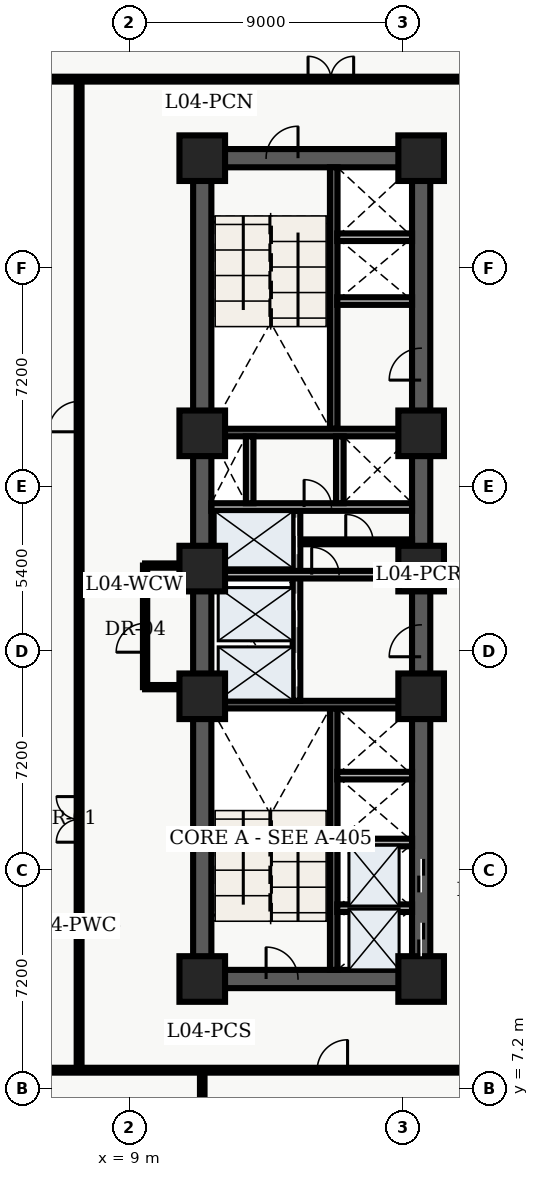
"""IFC4 building model, lengths in metres.
Left out: names, types, materials, properties, quantities, classifications, styles, units other than length and angle.
Written with IfcOpenShell. Run it as: python <this file> out.ifc"""

import sys

from ifc_helpers import new_model, entity, si_unit, converted_unit, direction, frame, origin_with_axes, origin_2d_with_axis, place, context, subcontext, project, spatial, polyline, rectangle, outline, extrude, element, fill, save


model = new_model("IFC4")
c1 = context("Model", 3, precision=1e-05, world=origin_with_axes(), true_north=direction((0.0, 1.0)))
c2 = subcontext(c1, "Body", "Model", "MODEL_VIEW")
j1 = project(units=[si_unit("LENGTHUNIT", "METRE"), converted_unit("PLANEANGLEUNIT", "DEGREE", entity("IfcPlaneAngleMeasure", 0.017), si_unit("PLANEANGLEUNIT", "RADIAN"), dimensions=[0, 0, 0, 0, 0, 0, 0])], contexts=[c1])
p1 = place(None, origin_with_axes())
s1 = spatial("IfcSite", under=j1, at=p1, CompositionType="ELEMENT")
p2 = place(p1, origin_with_axes())
s2 = spatial("IfcBuilding", under=s1, at=p2, CompositionType="ELEMENT")
p3 = place(p2, frame((0.0, 0.0, 19.8), z_axis=(0.0, 0.0, 1.0), x_axis=(1.0, 0.0, 0.0)))
s3 = spatial("IfcBuildingStorey", under=s2, at=p3, CompositionType="ELEMENT", Elevation=19.8)
p4 = place(p3, frame((11.4, 10.8, 0.0), z_axis=(0.0, 0.0, 1.0), x_axis=(0.0, 1.0, 0.0)))
e1 = element("IfcWall", 1, at=p4, inside=s3, PredefinedType="SHEAR", context=c2, shape_type="SweptSolid", body=[
    extrude(outline(polyline([(0.0, -0.3), (27.0, -0.3), (27.0, 0.3), (0.0, 0.3), (0.0, -0.3)])), origin_with_axes(), (0.0, 0.0, 1.0), 4.26),
])
p5 = place(p3, frame((11.4, 10.8, 0.0), z_axis=(0.0, 0.0, 1.0), x_axis=(1.0, 0.0, 0.0)))
e2 = element("IfcWall", 2, at=p5, inside=s3, PredefinedType="SHEAR", context=c2, shape_type="SweptSolid", body=[
    extrude(outline(polyline([(0.0, -0.3), (7.2, -0.3), (7.2, 0.3), (0.0, 0.3), (0.0, -0.3)])), origin_with_axes(), (0.0, 0.0, 1.0), 4.26),
])
p6 = place(p5, frame((2.625, 0.0, 0.0), z_axis=(0.0, 0.0, 1.0), x_axis=(1.0, 0.0, 0.0)))
e3 = element("IfcOpeningElement", 3, at=p6, cuts=e2, PredefinedType="OPENING", context=c2, shape_type="SweptSolid", body=[
    extrude(rectangle(XDim=1.05, YDim=0.62, at=origin_2d_with_axis()), origin_with_axes(), (0.0, 0.0, 1.0), 2.15),
])
p7 = place(p3, frame((11.4, 37.8, 0.0), z_axis=(0.0, 0.0, 1.0), x_axis=(1.0, 0.0, 0.0)))
e4 = element("IfcWall", 4, at=p7, inside=s3, PredefinedType="SHEAR", context=c2, shape_type="SweptSolid", body=[
    extrude(outline(polyline([(0.0, -0.3), (7.2, -0.3), (7.2, 0.3), (0.0, 0.3), (0.0, -0.3)])), origin_with_axes(), (0.0, 0.0, 1.0), 4.26),
])
p8 = place(p7, frame((2.625, 0.0, 0.0), z_axis=(0.0, 0.0, 1.0), x_axis=(1.0, 0.0, 0.0)))
e5 = element("IfcOpeningElement", 5, at=p8, cuts=e4, PredefinedType="OPENING", context=c2, shape_type="SweptSolid", body=[
    extrude(rectangle(XDim=1.05, YDim=0.62, at=origin_2d_with_axis()), origin_with_axes(), (0.0, 0.0, 1.0), 2.15),
])
p9 = place(p3, frame((18.6, 10.8, 0.0), z_axis=(0.0, 0.0, 1.0), x_axis=(0.0, 1.0, 0.0)))
e6 = element("IfcWall", 6, at=p9, inside=s3, PredefinedType="SHEAR", context=c2, shape_type="SweptSolid", body=[
    extrude(outline(polyline([(0.0, -0.3), (13.5, -0.3), (13.5, 0.3), (0.0, 0.3), (0.0, -0.3)])), origin_with_axes(), (0.0, 0.0, 1.0), 4.26),
])
p10 = place(p9, frame((1.3, 0.0, 0.0), z_axis=(0.0, 0.0, 1.0), x_axis=(1.0, 0.0, 0.0)))
e7 = element("IfcOpeningElement", 7, at=p10, cuts=e6, PredefinedType="OPENING", context=c2, shape_type="SweptSolid", body=[
    extrude(rectangle(XDim=1.1, YDim=0.62, at=origin_2d_with_axis()), origin_with_axes(), (0.0, 0.0, 1.0), 2.15),
])
p11 = place(p9, frame((3.4, 0.0, 0.0), z_axis=(0.0, 0.0, 1.0), x_axis=(1.0, 0.0, 0.0)))
e8 = element("IfcOpeningElement", 8, at=p11, cuts=e6, PredefinedType="OPENING", context=c2, shape_type="SweptSolid", body=[
    extrude(rectangle(XDim=1.1, YDim=0.62, at=origin_2d_with_axis()), origin_with_axes(), (0.0, 0.0, 1.0), 2.15),
])
p12 = place(p9, frame((11.125, 0.0, 0.0), z_axis=(0.0, 0.0, 1.0), x_axis=(1.0, 0.0, 0.0)))
e9 = element("IfcOpeningElement", 9, at=p12, cuts=e6, PredefinedType="OPENING", context=c2, shape_type="SweptSolid", body=[
    extrude(rectangle(XDim=1.05, YDim=0.62, at=origin_2d_with_axis()), origin_with_axes(), (0.0, 0.0, 1.0), 2.15),
])
p13 = place(p3, frame((18.6, 24.3, 0.0), z_axis=(0.0, 0.0, 1.0), x_axis=(0.0, 1.0, 0.0)))
e10 = element("IfcWall", 10, at=p13, inside=s3, PredefinedType="SHEAR", context=c2, shape_type="SweptSolid", body=[
    extrude(outline(polyline([(0.0, -0.3), (13.5, -0.3), (13.5, 0.3), (0.0, 0.3), (0.0, -0.3)])), origin_with_axes(), (0.0, 0.0, 1.0), 4.26),
])
p14 = place(p13, frame((6.725, 0.0, 0.0), z_axis=(0.0, 0.0, 1.0), x_axis=(1.0, 0.0, 0.0)))
e11 = element("IfcOpeningElement", 11, at=p14, cuts=e10, PredefinedType="OPENING", context=c2, shape_type="SweptSolid", body=[
    extrude(rectangle(XDim=1.05, YDim=0.62, at=origin_2d_with_axis()), origin_with_axes(), (0.0, 0.0, 1.0), 2.15),
])
p15 = place(p3, frame((15.725, 11.1, 0.0), z_axis=(0.0, 0.0, 1.0), x_axis=(0.0, 1.0, 0.0)))
e12 = element("IfcWall", 12, at=p15, inside=s3, PredefinedType="SHEAR", context=c2, shape_type="SweptSolid", body=[
    extrude(outline(polyline([(0.0, -0.125), (8.6, -0.125), (8.6, 0.125), (0.0, 0.125), (0.0, -0.125)])), origin_with_axes(), (0.0, 0.0, 1.0), 4.26),
])
p16 = place(p3, frame((11.7, 19.825, 0.0), z_axis=(0.0, 0.0, 1.0), x_axis=(1.0, 0.0, 0.0)))
e13 = element("IfcWall", 13, at=p16, inside=s3, PredefinedType="SHEAR", context=c2, shape_type="SweptSolid", body=[
    extrude(outline(polyline([(0.0, -0.125), (6.6, -0.125), (6.6, 0.125), (0.0, 0.125), (0.0, -0.125)])), origin_with_axes(), (0.0, 0.0, 1.0), 4.26),
])
p17 = place(p3, frame((15.725, 28.9, 0.0), z_axis=(0.0, 0.0, 1.0), x_axis=(0.0, 1.0, 0.0)))
e14 = element("IfcWall", 14, at=p17, inside=s3, PredefinedType="SHEAR", context=c2, shape_type="SweptSolid", body=[
    extrude(outline(polyline([(0.0, -0.125), (8.6, -0.125), (8.6, 0.125), (0.0, 0.125), (0.0, -0.125)])), origin_with_axes(), (0.0, 0.0, 1.0), 4.26),
])
p18 = place(p3, frame((11.7, 28.775, 0.0), z_axis=(0.0, 0.0, 1.0), x_axis=(1.0, 0.0, 0.0)))
e15 = element("IfcWall", 15, at=p18, inside=s3, PredefinedType="SHEAR", context=c2, shape_type="SweptSolid", body=[
    extrude(outline(polyline([(0.0, -0.125), (6.6, -0.125), (6.6, 0.125), (0.0, 0.125), (0.0, -0.125)])), origin_with_axes(), (0.0, 0.0, 1.0), 4.26),
])
p19 = place(p3, frame((14.5, 19.95, 0.0), z_axis=(0.0, 0.0, 1.0), x_axis=(0.0, 1.0, 0.0)))
e16 = element("IfcWall", 16, at=p19, inside=s3, PredefinedType="SOLIDWALL", context=c2, shape_type="SweptSolid", body=[
    extrude(outline(polyline([(0.0, -0.125), (6.25, -0.125), (6.25, 0.125), (0.0, 0.125), (0.0, -0.125)])), origin_with_axes(), (0.0, 0.0, 1.0), 3.3),
])
p20 = place(p19, frame((1.025, 0.0, 0.0), z_axis=(0.0, 0.0, 1.0), x_axis=(1.0, 0.0, 0.0)))
e17 = element("IfcOpeningElement", 17, at=p20, cuts=e16, PredefinedType="OPENING", context=c2, shape_type="SweptSolid", body=[
    extrude(rectangle(XDim=1.1, YDim=0.27, at=origin_2d_with_axis()), origin_with_axes(), (0.0, 0.0, 1.0), 2.15),
])
p21 = place(p19, frame((2.975, 0.0, 0.0), z_axis=(0.0, 0.0, 1.0), x_axis=(1.0, 0.0, 0.0)))
e18 = element("IfcOpeningElement", 18, at=p21, cuts=e16, PredefinedType="OPENING", context=c2, shape_type="SweptSolid", body=[
    extrude(rectangle(XDim=1.1, YDim=0.27, at=origin_2d_with_axis()), origin_with_axes(), (0.0, 0.0, 1.0), 2.15),
])
p22 = place(p19, frame((5.425, 0.0, 0.0), z_axis=(0.0, 0.0, 1.0), x_axis=(1.0, 0.0, 0.0)))
e19 = element("IfcOpeningElement", 19, at=p22, cuts=e16, PredefinedType="OPENING", context=c2, shape_type="SweptSolid", body=[
    extrude(rectangle(XDim=1.2, YDim=0.27, at=origin_2d_with_axis()), origin_with_axes(), (0.0, 0.0, 1.0), 2.15),
])
p23 = place(p3, frame((11.7, 24.1, 0.0), z_axis=(0.0, 0.0, 1.0), x_axis=(1.0, 0.0, 0.0)))
e20 = element("IfcWall", 20, at=p23, inside=s3, PredefinedType="SOLIDWALL", context=c2, shape_type="SweptSolid", body=[
    extrude(outline(polyline([(0.0, -0.125), (6.6, -0.125), (6.6, 0.125), (0.0, 0.125), (0.0, -0.125)])), origin_with_axes(), (0.0, 0.0, 1.0), 3.3),
])
p24 = place(p23, frame((3.75, 0.0, 0.0), z_axis=(0.0, 0.0, 1.0), x_axis=(1.0, 0.0, 0.0)))
e21 = element("IfcOpeningElement", 21, at=p24, cuts=e20, PredefinedType="OPENING", context=c2, shape_type="SweptSolid", body=[
    extrude(rectangle(XDim=0.9, YDim=0.27, at=origin_2d_with_axis()), origin_with_axes(), (0.0, 0.0, 1.0), 2.15),
])
p25 = place(p3, frame((11.7, 26.325, 0.0), z_axis=(0.0, 0.0, 1.0), x_axis=(1.0, 0.0, 0.0)))
e22 = element("IfcWall", 22, at=p25, inside=s3, PredefinedType="SOLIDWALL", context=c2, shape_type="SweptSolid", body=[
    extrude(outline(polyline([(0.0, -0.125), (6.6, -0.125), (6.6, 0.125), (0.0, 0.125), (0.0, -0.125)])), origin_with_axes(), (0.0, 0.0, 1.0), 3.3),
])
p26 = place(p25, frame((3.5, 0.0, 0.0), z_axis=(0.0, 0.0, 1.0), x_axis=(1.0, 0.0, 0.0)))
e23 = element("IfcOpeningElement", 23, at=p26, cuts=e22, PredefinedType="OPENING", context=c2, shape_type="SweptSolid", body=[
    extrude(rectangle(XDim=0.9, YDim=0.27, at=origin_2d_with_axis()), origin_with_axes(), (0.0, 0.0, 1.0), 2.15),
])
for number, where, z_axis, x_axis in (
    (24, (12.96, 26.45, 0.0), (0.0, 0.0, 1.0), (0.0, 1.0, 0.0)),
    (25, (15.925, 26.45, 0.0), (0.0, 0.0, 1.0), (0.0, 1.0, 0.0)),
):
    element("IfcWall", number, at=place(p3, frame(where, z_axis=z_axis, x_axis=x_axis)), inside=s3, PredefinedType="SOLIDWALL", context=c2, shape_type="SweptSolid", body=[
        extrude(outline(polyline([(0.0, -0.125), (2.2, -0.125), (2.2, 0.125), (0.0, 0.125), (0.0, -0.125)])), origin_with_axes(), (0.0, 0.0, 1.0), 3.3),
    ])
for number, where, z_axis, x_axis in (
    (26, (11.4, 10.8, 0.0), (0.0, 0.0, 1.0), (1.0, 0.0, 0.0)),
    (27, (11.4, 20.1, 0.0), (0.0, 0.0, 1.0), (1.0, 0.0, 0.0)),
    (28, (11.4, 24.3, 0.0), (0.0, 0.0, 1.0), (1.0, 0.0, 0.0)),
    (29, (11.4, 28.75, 0.0), (0.0, 0.0, 1.0), (1.0, 0.0, 0.0)),
    (30, (11.4, 37.8, 0.0), (0.0, 0.0, 1.0), (1.0, 0.0, 0.0)),
    (31, (18.6, 10.8, 0.0), (0.0, 0.0, 1.0), (1.0, 0.0, 0.0)),
    (32, (18.6, 20.1, 0.0), (0.0, 0.0, 1.0), (1.0, 0.0, 0.0)),
    (33, (18.6, 24.3, 0.0), (0.0, 0.0, 1.0), (1.0, 0.0, 0.0)),
    (34, (18.6, 28.75, 0.0), (0.0, 0.0, 1.0), (1.0, 0.0, 0.0)),
    (35, (18.6, 37.8, 0.0), (0.0, 0.0, 1.0), (1.0, 0.0, 0.0)),
):
    element("IfcColumn", number, at=place(p3, frame(where, z_axis=z_axis, x_axis=x_axis)), inside=s3, PredefinedType="COLUMN", context=c2, shape_type="SweptSolid", body=[
        extrude(rectangle(XDim=1.5, YDim=1.5, at=origin_2d_with_axis()), origin_with_axes(), (0.0, 0.0, 1.0), 4.5),
    ])
p27 = place(p3, frame((14.62, 25.18, 0.0), z_axis=(0.0, 0.0, 1.0), x_axis=(1.0, 0.0, 0.0)))
e36 = element("IfcWall", 36, at=p27, inside=s3, PredefinedType="PARTITIONING", context=c2, shape_type="SweptSolid", body=[
    extrude(outline(polyline([(0.0, -0.08), (3.68, -0.08), (3.68, 0.08), (0.0, 0.08), (0.0, -0.08)])), origin_with_axes(), (0.0, 0.0, 1.0), 3.2),
])
p28 = place(p27, frame((1.95, 0.0, 0.0), z_axis=(0.0, 0.0, 1.0), x_axis=(1.0, 0.0, 0.0)))
e37 = element("IfcOpeningElement", 37, at=p28, cuts=e36, PredefinedType="OPENING", context=c2, shape_type="SweptSolid", body=[
    extrude(rectangle(XDim=0.9, YDim=0.18, at=origin_2d_with_axis()), origin_with_axes(), (0.0, 0.0, 1.0), 2.15),
])
for number, where, z_axis, x_axis in (
    (38, (15.84, 13.13, 0.0), (0.0, 0.0, 1.0), (1.0, 0.0, 0.0)),
    (39, (15.84, 15.29, 0.0), (0.0, 0.0, 1.0), (1.0, 0.0, 0.0)),
    (40, (15.84, 17.49, 0.0), (0.0, 0.0, 1.0), (1.0, 0.0, 0.0)),
    (41, (15.84, 33.1, 0.0), (0.0, 0.0, 1.0), (1.0, 0.0, 0.0)),
    (42, (15.84, 35.2, 0.0), (0.0, 0.0, 1.0), (1.0, 0.0, 0.0)),
):
    element("IfcWall", number, at=place(p3, frame(where, z_axis=z_axis, x_axis=x_axis)), inside=s3, PredefinedType="SOLIDWALL", context=c2, shape_type="SweptSolid", body=[
        extrude(outline(polyline([(0.0, -0.125), (2.46, -0.125), (2.46, 0.125), (0.0, 0.125), (0.0, -0.125)])), origin_with_axes(), (0.0, 0.0, 1.0), 3.2),
    ])
p29 = place(p3, frame((9.52, 20.4, 0.0), z_axis=(0.0, 0.0, 1.0), x_axis=(0.0, 1.0, 0.0)))
e43 = element("IfcWall", 43, at=p29, inside=s3, PredefinedType="PARTITIONING", context=c2, shape_type="SweptSolid", body=[
    extrude(outline(polyline([(0.0, -0.07), (4.0, -0.07), (4.0, 0.07), (0.0, 0.07), (0.0, -0.07)])), origin_with_axes(), (0.0, 0.0, 1.0), 3.2),
])
p30 = place(p29, frame((1.625, 0.0, 0.0), z_axis=(0.0, 0.0, 1.0), x_axis=(1.0, 0.0, 0.0)))
e44 = element("IfcOpeningElement", 44, at=p30, cuts=e43, PredefinedType="OPENING", context=c2, shape_type="SweptSolid", body=[
    extrude(rectangle(XDim=0.95, YDim=0.16, at=origin_2d_with_axis()), origin_with_axes(), (0.0, 0.0, 1.0), 2.15),
])
for number, where, z_axis, x_axis in (
    (45, (9.52, 20.4, 0.0), (0.0, 0.0, 1.0), (1.0, 0.0, 0.0)),
    (46, (9.52, 24.4, 0.0), (0.0, 0.0, 1.0), (1.0, 0.0, 0.0)),
):
    element("IfcWall", number, at=place(p3, frame(where, z_axis=z_axis, x_axis=x_axis)), inside=s3, PredefinedType="PARTITIONING", context=c2, shape_type="SweptSolid", body=[
        extrude(outline(polyline([(0.0, -0.07), (1.58, -0.07), (1.58, 0.07), (0.0, 0.07), (0.0, -0.07)])), origin_with_axes(), (0.0, 0.0, 1.0), 3.2),
    ])
p31 = place(p3, frame((0.38, 7.8, 0.0), z_axis=(0.0, 0.0, 1.0), x_axis=(1.0, 0.0, 0.0)))
e47 = element("IfcWall", 47, at=p31, inside=s3, PredefinedType="PARTITIONING", context=c2, shape_type="SweptSolid", body=[
    extrude(outline(polyline([(0.0, -0.08), (20.92, -0.08), (20.92, 0.08), (0.0, 0.08), (0.0, -0.08)])), origin_with_axes(), (0.0, 0.0, 1.0), 3.2),
])
p32 = place(p31, frame((3.7, 0.0, 0.0), z_axis=(0.0, 0.0, 1.0), x_axis=(1.0, 0.0, 0.0)))
e48 = element("IfcOpeningElement", 48, at=p32, cuts=e47, PredefinedType="OPENING", context=c2, shape_type="SweptSolid", body=[
    extrude(rectangle(XDim=1.0, YDim=0.18, at=origin_2d_with_axis()), origin_with_axes(), (0.0, 0.0, 1.0), 2.15),
])
p33 = place(p31, frame((15.3, 0.0, 0.0), z_axis=(0.0, 0.0, 1.0), x_axis=(1.0, 0.0, 0.0)))
e49 = element("IfcOpeningElement", 49, at=p33, cuts=e47, PredefinedType="OPENING", context=c2, shape_type="SweptSolid", body=[
    extrude(rectangle(XDim=1.0, YDim=0.18, at=origin_2d_with_axis()), origin_with_axes(), (0.0, 0.0, 1.0), 2.15),
])
p34 = place(p3, frame((11.4, 0.38, 0.0), z_axis=(0.0, 0.0, 1.0), x_axis=(0.0, 1.0, 0.0)))
e50 = element("IfcWall", 50, at=p34, inside=s3, PredefinedType="PARTITIONING", context=c2, shape_type="SweptSolid", body=[
    extrude(outline(polyline([(0.0, -0.075), (7.42, -0.075), (7.42, 0.075), (0.0, 0.075), (0.0, -0.075)])), origin_with_axes(), (0.0, 0.0, 1.0), 3.2),
])
p35 = place(p3, frame((0.38, 40.4, 0.0), z_axis=(0.0, 0.0, 1.0), x_axis=(1.0, 0.0, 0.0)))
e51 = element("IfcWall", 51, at=p35, inside=s3, PredefinedType="PARTITIONING", context=c2, shape_type="SweptSolid", body=[
    extrude(outline(polyline([(0.0, -0.08), (20.92, -0.08), (20.92, 0.08), (0.0, 0.08), (0.0, -0.08)])), origin_with_axes(), (0.0, 0.0, 1.0), 3.2),
])
p36 = place(p35, frame((15.25, 0.0, 0.0), z_axis=(0.0, 0.0, 1.0), x_axis=(1.0, 0.0, 0.0)))
e52 = element("IfcOpeningElement", 52, at=p36, cuts=e51, PredefinedType="OPENING", context=c2, shape_type="SweptSolid", body=[
    extrude(rectangle(XDim=1.5, YDim=0.18, at=origin_2d_with_axis()), origin_with_axes(), (0.0, 0.0, 1.0), 2.2),
])
p37 = place(p3, frame((7.35, 7.8, 0.0), z_axis=(0.0, 0.0, 1.0), x_axis=(0.0, 1.0, 0.0)))
e53 = element("IfcWall", 53, at=p37, inside=s3, PredefinedType="PARTITIONING", context=c2, shape_type="SweptSolid", body=[
    extrude(outline(polyline([(0.0, -0.08), (32.6, -0.08), (32.6, 0.08), (0.0, 0.08), (0.0, -0.08)])), origin_with_axes(), (0.0, 0.0, 1.0), 3.2),
])
p38 = place(p37, frame((8.25, 0.0, 0.0), z_axis=(0.0, 0.0, 1.0), x_axis=(1.0, 0.0, 0.0)))
e54 = element("IfcOpeningElement", 54, at=p38, cuts=e53, PredefinedType="OPENING", context=c2, shape_type="SweptSolid", body=[
    extrude(rectangle(XDim=1.5, YDim=0.18, at=origin_2d_with_axis()), origin_with_axes(), (0.0, 0.0, 1.0), 2.2),
])
p39 = place(p37, frame((21.5, 0.0, 0.0), z_axis=(0.0, 0.0, 1.0), x_axis=(1.0, 0.0, 0.0)))
e55 = element("IfcOpeningElement", 55, at=p39, cuts=e53, PredefinedType="OPENING", context=c2, shape_type="SweptSolid", body=[
    extrude(rectangle(XDim=1.0, YDim=0.18, at=origin_2d_with_axis()), origin_with_axes(), (0.0, 0.0, 1.0), 2.15),
])
p40 = place(p9, frame((1.3, 0.0, 0.0), z_axis=(0.0, 0.0, 1.0), x_axis=(1.0, 0.0, 0.0)))
e56 = element("IfcDoor", 56, at=p40, inside=s3, OperationType="SLIDING_TO_LEFT", PredefinedType="DOOR", context=c2, shape_type="SweptSolid", body=[
    extrude(rectangle(XDim=1.1, YDim=0.09, at=origin_2d_with_axis()), origin_with_axes(), (0.0, 0.0, 1.0), 2.15),
])
fill(e7, e56)
p41 = place(p9, frame((3.4, 0.0, 0.0), z_axis=(0.0, 0.0, 1.0), x_axis=(1.0, 0.0, 0.0)))
e57 = element("IfcDoor", 57, at=p41, inside=s3, OperationType="SLIDING_TO_RIGHT", PredefinedType="DOOR", context=c2, shape_type="SweptSolid", body=[
    extrude(rectangle(XDim=1.1, YDim=0.09, at=origin_2d_with_axis()), origin_with_axes(), (0.0, 0.0, 1.0), 2.15),
])
fill(e8, e57)
p42 = place(p19, frame((1.025, 0.0, 0.0), z_axis=(0.0, 0.0, 1.0), x_axis=(1.0, 0.0, 0.0)))
e58 = element("IfcDoor", 58, at=p42, inside=s3, OperationType="SLIDING_TO_LEFT", PredefinedType="DOOR", context=c2, shape_type="SweptSolid", body=[
    extrude(rectangle(XDim=1.1, YDim=0.09, at=origin_2d_with_axis()), origin_with_axes(), (0.0, 0.0, 1.0), 2.15),
])
fill(e17, e58)
p43 = place(p19, frame((2.975, 0.0, 0.0), z_axis=(0.0, 0.0, 1.0), x_axis=(1.0, 0.0, 0.0)))
e59 = element("IfcDoor", 59, at=p43, inside=s3, OperationType="SLIDING_TO_RIGHT", PredefinedType="DOOR", context=c2, shape_type="SweptSolid", body=[
    extrude(rectangle(XDim=1.1, YDim=0.09, at=origin_2d_with_axis()), origin_with_axes(), (0.0, 0.0, 1.0), 2.15),
])
fill(e18, e59)
p44 = place(p19, frame((5.425, 0.0, 0.0), z_axis=(0.0, 0.0, 1.0), x_axis=(1.0, 0.0, 0.0)))
e60 = element("IfcDoor", 60, at=p44, inside=s3, OperationType="DOUBLE_DOOR_SLIDING", PredefinedType="DOOR", context=c2, shape_type="SweptSolid", body=[
    extrude(rectangle(XDim=1.2, YDim=0.09, at=origin_2d_with_axis()), origin_with_axes(), (0.0, 0.0, 1.0), 2.15),
])
fill(e19, e60)
p45 = place(p5, frame((2.625, 0.0, 0.0), z_axis=(0.0, 0.0, 1.0), x_axis=(1.0, 0.0, 0.0)))
e61 = element("IfcDoor", 61, at=p45, inside=s3, OperationType="SINGLE_SWING_LEFT", PredefinedType="DOOR", context=c2, shape_type="SweptSolid", body=[
    extrude(rectangle(XDim=1.05, YDim=0.09, at=origin_2d_with_axis()), origin_with_axes(), (0.0, 0.0, 1.0), 2.15),
])
fill(e3, e61)
p46 = place(p7, frame((2.625, 0.0, 0.0), z_axis=(0.0, 0.0, 1.0), x_axis=(1.0, 0.0, 0.0)))
e62 = element("IfcDoor", 62, at=p46, inside=s3, OperationType="SINGLE_SWING_RIGHT", PredefinedType="DOOR", context=c2, shape_type="SweptSolid", body=[
    extrude(rectangle(XDim=1.05, YDim=0.09, at=origin_2d_with_axis()), origin_with_axes(), (0.0, 0.0, 1.0), 2.15),
])
fill(e5, e62)
p47 = place(p9, frame((11.125, 0.0, 0.0), z_axis=(0.0, 0.0, 1.0), x_axis=(1.0, 0.0, 0.0)))
e63 = element("IfcDoor", 63, at=p47, inside=s3, OperationType="SINGLE_SWING_LEFT", PredefinedType="DOOR", context=c2, shape_type="SweptSolid", body=[
    extrude(rectangle(XDim=1.05, YDim=0.09, at=origin_2d_with_axis()), origin_with_axes(), (0.0, 0.0, 1.0), 2.15),
])
fill(e9, e63)
p48 = place(p25, frame((3.5, 0.0, 0.0), z_axis=(0.0, 0.0, 1.0), x_axis=(1.0, 0.0, 0.0)))
e64 = element("IfcDoor", 64, at=p48, inside=s3, OperationType="SINGLE_SWING_LEFT", PredefinedType="DOOR", context=c2, shape_type="SweptSolid", body=[
    extrude(rectangle(XDim=0.9, YDim=0.09, at=origin_2d_with_axis()), origin_with_axes(), (0.0, 0.0, 1.0), 2.15),
])
fill(e23, e64)
p49 = place(p23, frame((3.75, 0.0, 0.0), z_axis=(0.0, 0.0, 1.0), x_axis=(1.0, 0.0, 0.0)))
e65 = element("IfcDoor", 65, at=p49, inside=s3, OperationType="SINGLE_SWING_LEFT", PredefinedType="DOOR", context=c2, shape_type="SweptSolid", body=[
    extrude(rectangle(XDim=0.9, YDim=0.09, at=origin_2d_with_axis()), origin_with_axes(), (0.0, 0.0, 1.0), 2.15),
])
fill(e21, e65)
p50 = place(p27, frame((1.95, 0.0, 0.0), z_axis=(0.0, 0.0, 1.0), x_axis=(1.0, 0.0, 0.0)))
e66 = element("IfcDoor", 66, at=p50, inside=s3, OperationType="SINGLE_SWING_LEFT", PredefinedType="DOOR", context=c2, shape_type="SweptSolid", body=[
    extrude(rectangle(XDim=0.9, YDim=0.09, at=origin_2d_with_axis()), origin_with_axes(), (0.0, 0.0, 1.0), 2.15),
])
fill(e37, e66)
p51 = place(p13, frame((6.725, 0.0, 0.0), z_axis=(0.0, 0.0, 1.0), x_axis=(1.0, 0.0, 0.0)))
e67 = element("IfcDoor", 67, at=p51, inside=s3, OperationType="SINGLE_SWING_LEFT", PredefinedType="DOOR", context=c2, shape_type="SweptSolid", body=[
    extrude(rectangle(XDim=1.05, YDim=0.09, at=origin_2d_with_axis()), origin_with_axes(), (0.0, 0.0, 1.0), 2.15),
])
fill(e11, e67)
p52 = place(p29, frame((1.625, 0.0, 0.0), z_axis=(0.0, 0.0, 1.0), x_axis=(1.0, 0.0, 0.0)))
e68 = element("IfcDoor", 68, at=p52, inside=s3, OperationType="SINGLE_SWING_LEFT", PredefinedType="DOOR", context=c2, shape_type="SweptSolid", body=[
    extrude(rectangle(XDim=0.95, YDim=0.084, at=origin_2d_with_axis()), origin_with_axes(), (0.0, 0.0, 1.0), 2.15),
])
fill(e44, e68)
p53 = place(p31, frame((15.3, 0.0, 0.0), z_axis=(0.0, 0.0, 1.0), x_axis=(1.0, 0.0, 0.0)))
e69 = element("IfcDoor", 69, at=p53, inside=s3, OperationType="SINGLE_SWING_RIGHT", PredefinedType="DOOR", context=c2, shape_type="SweptSolid", body=[
    extrude(rectangle(XDim=1.0, YDim=0.09, at=origin_2d_with_axis()), origin_with_axes(), (0.0, 0.0, 1.0), 2.15),
])
fill(e49, e69)
p54 = place(p37, frame((8.25, 0.0, 0.0), z_axis=(0.0, 0.0, 1.0), x_axis=(1.0, 0.0, 0.0)))
e70 = element("IfcDoor", 70, at=p54, inside=s3, OperationType="DOUBLE_DOOR_SINGLE_SWING", PredefinedType="DOOR", context=c2, shape_type="SweptSolid", body=[
    extrude(rectangle(XDim=1.5, YDim=0.09, at=origin_2d_with_axis()), origin_with_axes(), (0.0, 0.0, 1.0), 2.2),
])
fill(e54, e70)
p55 = place(p37, frame((21.5, 0.0, 0.0), z_axis=(0.0, 0.0, 1.0), x_axis=(1.0, 0.0, 0.0)))
e71 = element("IfcDoor", 71, at=p55, inside=s3, OperationType="SINGLE_SWING_LEFT", PredefinedType="DOOR", context=c2, shape_type="SweptSolid", body=[
    extrude(rectangle(XDim=1.0, YDim=0.09, at=origin_2d_with_axis()), origin_with_axes(), (0.0, 0.0, 1.0), 2.15),
])
fill(e55, e71)
p56 = place(p35, frame((15.25, 0.0, 0.0), z_axis=(0.0, 0.0, 1.0), x_axis=(1.0, 0.0, 0.0)))
e72 = element("IfcDoor", 72, at=p56, inside=s3, OperationType="DOUBLE_DOOR_SINGLE_SWING", PredefinedType="DOOR", context=c2, shape_type="SweptSolid", body=[
    extrude(rectangle(XDim=1.5, YDim=0.09, at=origin_2d_with_axis()), origin_with_axes(), (0.0, 0.0, 1.0), 2.2),
])
fill(e52, e72)
save(model, sys.argv[1])
